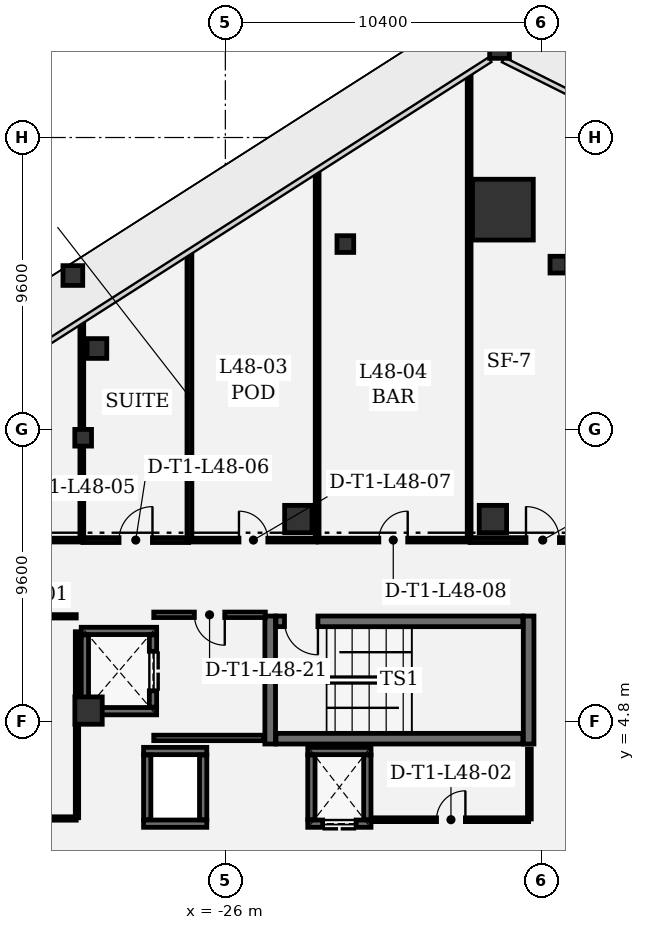
"""IFC4 building model, lengths in metres.
Left out: names, types, materials, properties, quantities, classifications, styles, units other than length and angle.
Written with IfcOpenShell. Run it as: python <this file> out.ifc"""

import sys

from ifc_helpers import new_model, si_unit, direction, frame, frame_2d, origin, origin_2d, place, context, subcontext, project, spatial, rectangle, extrude, element, fill, save


model = new_model("IFC4")
c1 = context("Model", 3, precision=1e-05, world=origin(), true_north=direction((0.0, 1.0)))
c2 = subcontext(c1, "Body", "Model", "MODEL_VIEW")
j1 = project(units=[si_unit("LENGTHUNIT", "METRE"), si_unit("PLANEANGLEUNIT", "RADIAN")], contexts=[c1])
p1 = place(None, origin())
s1 = spatial("IfcSite", under=j1, at=p1, CompositionType="ELEMENT")
p2 = place(p1, origin())
s2 = spatial("IfcBuilding", under=s1, at=p2, CompositionType="ELEMENT")
p3 = place(p2, frame((0.0, 0.0, 209.1)))
s3 = spatial("IfcBuildingStorey", under=s2, at=p3, CompositionType="ELEMENT", Elevation=209.1)
p4 = place(p3, frame((-16.872, 21.627, 0.0), z_axis=(0.0, 0.0, 1.0), x_axis=(1.0, 0.0, 0.0)))
e1 = element("IfcColumn", 1, at=p4, inside=s3, PredefinedType="COLUMN", context=c2, shape_type="SweptSolid", body=[
    extrude(rectangle(XDim=2.0, YDim=2.0, at=origin_2d()), origin(), (0.0, 0.0, 1.0), 4.05),
])
for number, where, z_axis, x_axis in (
    (2, (-23.6, 11.45, 0.0), (0.0, 0.0, 1.0), (1.0, 0.0, 0.0)),
    (3, (-17.2, 11.45, 0.0), (0.0, 0.0, 1.0), (1.0, 0.0, 0.0)),
    (4, (-30.5, 5.15, 0.0), (0.0, 0.0, 1.0), (1.0, 0.0, 0.0)),
):
    element("IfcColumn", number, at=place(p3, frame(where, z_axis=z_axis, x_axis=x_axis)), inside=s3, PredefinedType="COLUMN", context=c2, shape_type="SweptSolid", body=[
        extrude(rectangle(XDim=0.9, YDim=0.9, at=origin_2d()), origin(), (0.0, 0.0, 1.0), 4.05),
    ])
for number, where, z_axis, x_axis in (
    (5, (-31.016, 19.46, 0.0), (0.0, 0.0, 1.0), (1.0, 0.0, 0.0)),
    (6, (-16.981, 26.929, 0.0), (0.0, 0.0, 1.0), (1.0, 0.0, 0.0)),
    (7, (-30.225, 17.06, 0.0), (0.0, 0.0, 1.0), (1.0, 0.0, 0.0)),
):
    element("IfcColumn", number, at=place(p3, frame(where, z_axis=z_axis, x_axis=x_axis)), inside=s3, PredefinedType="COLUMN", context=c2, shape_type="SweptSolid", body=[
        extrude(rectangle(XDim=0.65, YDim=0.65, at=origin_2d()), origin(), (0.0, 0.0, 1.0), 4.05),
    ])
for number, where, z_axis, x_axis in (
    (8, (-22.053, 20.495, 0.0), (0.0, 0.0, 1.0), (1.0, 0.0, 0.0)),
    (9, (-30.677, 14.124, 0.0), (0.0, 0.0, 1.0), (1.0, 0.0, 0.0)),
    (10, (-15.046, 19.818, 0.0), (0.0, 0.0, 1.0), (1.0, 0.0, 0.0)),
):
    element("IfcColumn", number, at=place(p3, frame(where, z_axis=z_axis, x_axis=x_axis)), inside=s3, PredefinedType="COLUMN", context=c2, shape_type="SweptSolid", body=[
        extrude(rectangle(XDim=0.55, YDim=0.55, at=origin_2d()), origin(), (0.0, 0.0, 1.0), 4.05),
    ])
for number, where, z_axis, x_axis in (
    (11, (-24.525, 8.26, 0.0), (0.0, 0.0, 1.0), (0.0, -1.0, 0.0)),
    (12, (-16.025, 4.05, 0.0), (0.0, 0.0, 1.0), (0.0, 1.0, 0.0)),
):
    element("IfcWall", number, at=place(p3, frame(where, z_axis=z_axis, x_axis=x_axis)), inside=s3, PredefinedType="SHEAR", context=c2, shape_type="SweptSolid", body=[
        extrude(rectangle(XDim=4.21, YDim=0.35, at=frame_2d((2.105, 0.0))), origin(), (0.0, 0.0, 1.0), 3.78),
    ])
p5 = place(p3, frame((-24.335, 4.225, 0.0), z_axis=(0.0, 0.0, 1.0), x_axis=(1.0, 0.0, 0.0)))
e13 = element("IfcWall", 13, at=p5, inside=s3, PredefinedType="SHEAR", context=c2, shape_type="SweptSolid", body=[
    extrude(rectangle(XDim=8.12, YDim=0.35, at=frame_2d((4.06, 0.0))), origin(), (0.0, 0.0, 1.0), 3.78),
])
p6 = place(p3, frame((-16.215, 8.085, 0.0), z_axis=(0.0, 0.0, 1.0), x_axis=(-1.0, 0.0, 0.0)))
e14 = element("IfcWall", 14, at=p6, inside=s3, PredefinedType="SHEAR", context=c2, shape_type="SweptSolid", body=[
    extrude(rectangle(XDim=8.12, YDim=0.35, at=frame_2d((4.06, 0.0))), origin(), (0.0, 0.0, 1.0), 3.78),
])
p7 = place(p6, frame((6.74, 0.0, 0.0)))
e15 = element("IfcOpeningElement", 15, at=p7, cuts=e14, PredefinedType="OPENING", context=c2, shape_type="SweptSolid", body=[
    extrude(rectangle(XDim=1.1, YDim=2.2, at=frame_2d((0.55, 1.1))), frame((0.0, 0.185, 0.0), z_axis=(0.0, -1.0, 0.0), x_axis=(1.0, 0.0, 0.0)), (0.0, 0.0, 1.0), 0.37),
])
for number, where, z_axis, x_axis in (
    (16, (-28.26, 5.13, 0.0), (0.0, 0.0, 1.0), (-1.0, 0.0, 0.0)),
    (17, (-30.74, 7.77, 0.0), (0.0, 0.0, 1.0), (1.0, 0.0, 0.0)),
):
    element("IfcWall", number, at=place(p3, frame(where, z_axis=z_axis, x_axis=x_axis)), inside=s3, PredefinedType="SHEAR", context=c2, shape_type="SweptSolid", body=[
        extrude(rectangle(XDim=2.48, YDim=0.24, at=frame_2d((1.24, 0.0))), origin(), (0.0, 0.0, 1.0), 3.78),
    ])
p8 = place(p3, frame((-30.62, 5.262, 0.0), z_axis=(0.0, 0.0, 1.0), x_axis=(0.0, 1.0, 0.0)))
e18 = element("IfcWall", 18, at=p8, inside=s3, PredefinedType="SHEAR", context=c2, shape_type="SweptSolid", body=[
    extrude(rectangle(XDim=2.376, YDim=0.24, at=frame_2d((1.188, 0.0))), origin(), (0.0, 0.0, 1.0), 3.78),
])
p9 = place(p3, frame((-28.38, 7.638, 0.0), z_axis=(0.0, 0.0, 1.0), x_axis=(0.0, -1.0, 0.0)))
e19 = element("IfcWall", 19, at=p9, inside=s3, PredefinedType="SHEAR", context=c2, shape_type="SweptSolid", body=[
    extrude(rectangle(XDim=2.376, YDim=0.24, at=frame_2d((1.188, 0.0))), origin(), (0.0, 0.0, 1.0), 3.78),
])
p10 = place(p9, frame((0.538, 0.0, 0.0)))
e20 = element("IfcOpeningElement", 20, at=p10, cuts=e19, PredefinedType="OPENING", context=c2, shape_type="SweptSolid", body=[
    extrude(rectangle(XDim=1.3, YDim=2.3, at=frame_2d((0.65, 1.15))), frame((0.0, 0.13, 0.0), z_axis=(0.0, -1.0, 0.0), x_axis=(1.0, 0.0, 0.0)), (0.0, 0.0, 1.0), 0.26),
])
for number, where, z_axis, x_axis in (
    (21, (-26.61, 1.43, 0.0), (0.0, 0.0, 1.0), (-1.0, 0.0, 0.0)),
    (22, (-28.69, 3.82, 0.0), (0.0, 0.0, 1.0), (1.0, 0.0, 0.0)),
):
    element("IfcWall", number, at=place(p3, frame(where, z_axis=z_axis, x_axis=x_axis)), inside=s3, PredefinedType="SHEAR", context=c2, shape_type="SweptSolid", body=[
        extrude(rectangle(XDim=2.08, YDim=0.24, at=frame_2d((1.04, 0.0))), origin(), (0.0, 0.0, 1.0), 3.78),
    ])
for number, where, z_axis, x_axis in (
    (23, (-28.57, 1.562, 0.0), (0.0, 0.0, 1.0), (0.0, 1.0, 0.0)),
    (24, (-26.73, 3.688, 0.0), (0.0, 0.0, 1.0), (0.0, -1.0, 0.0)),
):
    element("IfcWall", number, at=place(p3, frame(where, z_axis=z_axis, x_axis=x_axis)), inside=s3, PredefinedType="SHEAR", context=c2, shape_type="SweptSolid", body=[
        extrude(rectangle(XDim=2.126, YDim=0.24, at=frame_2d((1.063, 0.0))), origin(), (0.0, 0.0, 1.0), 3.78),
    ])
p11 = place(p3, frame((-21.21, 1.43, 0.0), z_axis=(0.0, 0.0, 1.0), x_axis=(-1.0, 0.0, 0.0)))
e25 = element("IfcWall", 25, at=p11, inside=s3, PredefinedType="SHEAR", context=c2, shape_type="SweptSolid", body=[
    extrude(rectangle(XDim=2.08, YDim=0.24, at=frame_2d((1.04, 0.0))), origin(), (0.0, 0.0, 1.0), 3.78),
])
p12 = place(p11, frame((0.49, 0.0, 0.0)))
e26 = element("IfcOpeningElement", 26, at=p12, cuts=e25, PredefinedType="OPENING", context=c2, shape_type="SweptSolid", body=[
    extrude(rectangle(XDim=1.1, YDim=2.2, at=frame_2d((0.55, 1.1))), frame((0.0, 0.13, 0.0), z_axis=(0.0, -1.0, 0.0), x_axis=(1.0, 0.0, 0.0)), (0.0, 0.0, 1.0), 0.26),
])
p13 = place(p3, frame((-23.29, 3.82, 0.0), z_axis=(0.0, 0.0, 1.0), x_axis=(1.0, 0.0, 0.0)))
e27 = element("IfcWall", 27, at=p13, inside=s3, PredefinedType="SHEAR", context=c2, shape_type="SweptSolid", body=[
    extrude(rectangle(XDim=2.08, YDim=0.24, at=frame_2d((1.04, 0.0))), origin(), (0.0, 0.0, 1.0), 3.78),
])
for number, where, z_axis, x_axis in (
    (28, (-23.17, 1.562, 0.0), (0.0, 0.0, 1.0), (0.0, 1.0, 0.0)),
    (29, (-21.33, 3.688, 0.0), (0.0, 0.0, 1.0), (0.0, -1.0, 0.0)),
):
    element("IfcWall", number, at=place(p3, frame(where, z_axis=z_axis, x_axis=x_axis)), inside=s3, PredefinedType="SHEAR", context=c2, shape_type="SweptSolid", body=[
        extrude(rectangle(XDim=2.126, YDim=0.24, at=frame_2d((1.063, 0.0))), origin(), (0.0, 0.0, 1.0), 3.78),
    ])
p14 = place(p3, frame((-28.355, 4.25, 0.0), z_axis=(0.0, 0.0, 1.0), x_axis=(1.0, 0.0, 0.0)))
e30 = element("IfcWall", 30, at=p14, inside=s3, PredefinedType="PARTITIONING", context=c2, shape_type="SweptSolid", body=[
    extrude(rectangle(XDim=3.622, YDim=0.18, at=frame_2d((1.811, 0.0))), origin(), (0.0, 0.0, 1.0), 3.78),
])
p15 = place(p3, frame((-24.684, 8.3, 0.0), z_axis=(0.0, 0.0, 1.0), x_axis=(-1.0, 0.0, 0.0)))
e31 = element("IfcWall", 31, at=p15, inside=s3, PredefinedType="PARTITIONING", context=c2, shape_type="SweptSolid", body=[
    extrude(rectangle(XDim=3.671, YDim=0.18, at=frame_2d((1.835, 0.0))), origin(), (0.0, 0.0, 1.0), 3.78),
])
p16 = place(p15, frame((1.335, 0.0, 0.0)))
e32 = element("IfcOpeningElement", 32, at=p16, cuts=e31, PredefinedType="OPENING", context=c2, shape_type="SweptSolid", body=[
    extrude(rectangle(XDim=1.0, YDim=2.15, at=frame_2d((0.5, 1.075))), frame((0.0, 0.1, 0.0), z_axis=(0.0, -1.0, 0.0), x_axis=(1.0, 0.0, 0.0)), (0.0, 0.0, 1.0), 0.2),
])
p17 = place(p3, frame((-34.155, 1.6, 0.0), z_axis=(0.0, 0.0, 1.0), x_axis=(1.0, 0.0, 0.0)))
e33 = element("IfcWall", 33, at=p17, inside=s3, PredefinedType="PARTITIONING", context=c2, shape_type="SweptSolid", body=[
    extrude(rectangle(XDim=3.25, YDim=0.11, at=frame_2d((1.625, 0.0))), origin(), (0.0, 0.0, 1.0), 3.78),
])
p18 = place(p3, frame((-30.88, 1.625, 0.0), z_axis=(0.0, 0.0, 1.0), x_axis=(0.0, 1.0, 0.0)))
e34 = element("IfcWall", 34, at=p18, inside=s3, PredefinedType="PARTITIONING", context=c2, shape_type="SweptSolid", body=[
    extrude(rectangle(XDim=3.01, YDim=0.11, at=frame_2d((1.505, 0.0))), origin(), (0.0, 0.0, 1.0), 3.78),
])
p19 = place(p3, frame((-30.88, 5.665, 0.0), z_axis=(0.0, 0.0, 1.0), x_axis=(0.0, 1.0, 0.0)))
e35 = element("IfcWall", 35, at=p19, inside=s3, PredefinedType="PARTITIONING", context=c2, shape_type="SweptSolid", body=[
    extrude(rectangle(XDim=2.078, YDim=0.11, at=frame_2d((1.039, 0.0))), origin(), (0.0, 0.0, 1.0), 3.78),
])
p20 = place(p3, frame((-30.905, 8.25, 0.0), z_axis=(0.0, 0.0, 1.0), x_axis=(-1.0, 0.0, 0.0)))
e36 = element("IfcWall", 36, at=p20, inside=s3, PredefinedType="PARTITIONING", context=c2, shape_type="SweptSolid", body=[
    extrude(rectangle(XDim=3.25, YDim=0.11, at=frame_2d((1.625, 0.0))), origin(), (0.0, 0.0, 1.0), 3.78),
])
p21 = place(p3, frame((-21.134, 1.56, 0.0), z_axis=(0.0, 0.0, 1.0), x_axis=(1.0, 0.0, 0.0)))
e37 = element("IfcWall", 37, at=p21, inside=s3, PredefinedType="PARTITIONING", context=c2, shape_type="SweptSolid", body=[
    extrude(rectangle(XDim=5.109, YDim=0.125, at=frame_2d((2.554, 0.0))), origin(), (0.0, 0.0, 1.0), 3.78),
])
p22 = place(p21, frame((2.079, 0.0, 0.0)))
e38 = element("IfcOpeningElement", 38, at=p22, cuts=e37, PredefinedType="OPENING", context=c2, shape_type="SweptSolid", body=[
    extrude(rectangle(XDim=0.95, YDim=2.15, at=frame_2d((0.475, 1.075))), frame((0.0, 0.073, 0.0), z_axis=(0.0, -1.0, 0.0), x_axis=(1.0, 0.0, 0.0)), (0.0, 0.0, 1.0), 0.145),
])
p23 = place(p3, frame((-16.0, 1.585, 0.0), z_axis=(0.0, 0.0, 1.0), x_axis=(0.0, 1.0, 0.0)))
e39 = element("IfcWall", 39, at=p23, inside=s3, PredefinedType="PARTITIONING", context=c2, shape_type="SweptSolid", body=[
    extrude(rectangle(XDim=2.302, YDim=0.125, at=frame_2d((1.151, 0.0))), origin(), (0.0, 0.0, 1.0), 3.78),
])
p24 = place(p3, frame((-34.625, 10.758, 0.0), z_axis=(0.0, 0.0, 1.0), x_axis=(1.0, 0.0, 0.0)))
e40 = element("IfcWall", 40, at=p24, inside=s3, PredefinedType="PARTITIONING", context=c2, shape_type="SweptSolid", body=[
    extrude(rectangle(XDim=3.879, YDim=0.125, at=frame_2d((1.939, 0.0))), origin(), (0.0, 0.0, 1.0), 2.9),
])
p25 = place(p24, frame((1.464, 0.0, 0.0)))
e41 = element("IfcOpeningElement", 41, at=p25, cuts=e40, PredefinedType="OPENING", context=c2, shape_type="SweptSolid", body=[
    extrude(rectangle(XDim=0.95, YDim=2.15, at=frame_2d((0.475, 1.075))), frame((0.0, 0.073, 0.0), z_axis=(0.0, -1.0, 0.0), x_axis=(1.0, 0.0, 0.0)), (0.0, 0.0, 1.0), 0.145),
])
p26 = place(p3, frame((-30.721, 10.783, 0.0), z_axis=(0.0, 0.0, 1.0), x_axis=(0.0, 1.0, 0.0)))
e42 = element("IfcWall", 42, at=p26, inside=s3, PredefinedType="PARTITIONING", context=c2, shape_type="SweptSolid", body=[
    extrude(rectangle(XDim=3.001, YDim=0.125, at=frame_2d((1.5, 0.0))), origin(), (0.0, 0.0, 1.0), 3.78),
])
p27 = place(p3, frame((-30.721, 14.464, 0.0), z_axis=(0.0, 0.0, 1.0), x_axis=(0.0, 1.0, 0.0)))
e43 = element("IfcWall", 43, at=p27, inside=s3, PredefinedType="PARTITIONING", context=c2, shape_type="SweptSolid", body=[
    extrude(rectangle(XDim=3.434, YDim=0.125, at=frame_2d((1.717, 0.0))), origin(), (0.0, 0.0, 1.0), 3.78),
])
p28 = place(p3, frame((-30.688, 10.758, 0.0), z_axis=(0.0, 0.0, 1.0), x_axis=(1.0, 0.0, 0.0)))
e44 = element("IfcWall", 44, at=p28, inside=s3, PredefinedType="PARTITIONING", context=c2, shape_type="SweptSolid", body=[
    extrude(rectangle(XDim=3.481, YDim=0.16, at=frame_2d((1.741, 0.0))), origin(), (0.0, 0.0, 1.0), 3.78),
])
p29 = place(p28, frame((1.191, 0.0, 0.0)))
e45 = element("IfcOpeningElement", 45, at=p29, cuts=e44, PredefinedType="OPENING", context=c2, shape_type="SweptSolid", body=[
    extrude(rectangle(XDim=1.1, YDim=2.15, at=frame_2d((0.55, 1.075))), frame((0.0, 0.09, 0.0), z_axis=(0.0, -1.0, 0.0), x_axis=(1.0, 0.0, 0.0)), (0.0, 0.0, 1.0), 0.18),
])
p30 = place(p3, frame((-27.182, 10.783, 0.0), z_axis=(0.0, 0.0, 1.0), x_axis=(0.0, 1.0, 0.0)))
e46 = element("IfcWall", 46, at=p30, inside=s3, PredefinedType="PARTITIONING", context=c2, shape_type="SweptSolid", body=[
    extrude(rectangle(XDim=9.378, YDim=0.16, at=frame_2d((4.689, 0.0))), origin(), (0.0, 0.0, 1.0), 3.344),
])
p31 = place(p3, frame((-27.149, 10.758, 0.0), z_axis=(0.0, 0.0, 1.0), x_axis=(1.0, 0.0, 0.0)))
e47 = element("IfcWall", 47, at=p31, inside=s3, PredefinedType="PARTITIONING", context=c2, shape_type="SweptSolid", body=[
    extrude(rectangle(XDim=4.143, YDim=0.125, at=frame_2d((2.072, 0.0))), origin(), (0.0, 0.0, 1.0), 3.78),
])
p32 = place(p31, frame((1.596, 0.0, 0.0)))
e48 = element("IfcOpeningElement", 48, at=p32, cuts=e47, PredefinedType="OPENING", context=c2, shape_type="SweptSolid", body=[
    extrude(rectangle(XDim=0.95, YDim=2.15, at=frame_2d((0.475, 1.075))), frame((0.0, 0.073, 0.0), z_axis=(0.0, -1.0, 0.0), x_axis=(1.0, 0.0, 0.0)), (0.0, 0.0, 1.0), 0.145),
])
p33 = place(p3, frame((-22.981, 10.783, 0.0), z_axis=(0.0, 0.0, 1.0), x_axis=(0.0, 1.0, 0.0)))
e49 = element("IfcWall", 49, at=p33, inside=s3, PredefinedType="PARTITIONING", context=c2, shape_type="SweptSolid", body=[
    extrude(rectangle(XDim=12.062, YDim=0.125, at=frame_2d((6.031, 0.0))), origin(), (0.0, 0.0, 1.0), 2.895),
])
p34 = place(p3, frame((-22.948, 10.758, 0.0), z_axis=(0.0, 0.0, 1.0), x_axis=(1.0, 0.0, 0.0)))
e50 = element("IfcWall", 50, at=p34, inside=s3, PredefinedType="PARTITIONING", context=c2, shape_type="SweptSolid", body=[
    extrude(rectangle(XDim=4.942, YDim=0.125, at=frame_2d((2.471, 0.0))), origin(), (0.0, 0.0, 1.0), 3.78),
])
p35 = place(p34, frame((1.996, 0.0, 0.0)))
e51 = element("IfcOpeningElement", 51, at=p35, cuts=e50, PredefinedType="OPENING", context=c2, shape_type="SweptSolid", body=[
    extrude(rectangle(XDim=0.95, YDim=2.15, at=frame_2d((0.475, 1.075))), frame((0.0, 0.073, 0.0), z_axis=(0.0, -1.0, 0.0), x_axis=(1.0, 0.0, 0.0)), (0.0, 0.0, 1.0), 0.145),
])
p36 = place(p3, frame((-17.981, 10.783, 0.0), z_axis=(0.0, 0.0, 1.0), x_axis=(0.0, 1.0, 0.0)))
e52 = element("IfcWall", 52, at=p36, inside=s3, PredefinedType="PARTITIONING", context=c2, shape_type="SweptSolid", body=[
    extrude(rectangle(XDim=15.258, YDim=0.125, at=frame_2d((7.629, 0.0))), origin(), (0.0, 0.0, 1.0), 2.895),
])
p37 = place(p3, frame((-17.948, 10.758, 0.0), z_axis=(0.0, 0.0, 1.0), x_axis=(1.0, 0.0, 0.0)))
e53 = element("IfcWall", 53, at=p37, inside=s3, PredefinedType="PARTITIONING", context=c2, shape_type="SweptSolid", body=[
    extrude(rectangle(XDim=4.774, YDim=0.16, at=frame_2d((2.387, 0.0))), origin(), (0.0, 0.0, 1.0), 3.344),
])
p38 = place(p37, frame((1.837, 0.0, 0.0)))
e54 = element("IfcOpeningElement", 54, at=p38, cuts=e53, PredefinedType="OPENING", context=c2, shape_type="SweptSolid", body=[
    extrude(rectangle(XDim=1.1, YDim=2.15, at=frame_2d((0.55, 1.075))), frame((0.0, 0.09, 0.0), z_axis=(0.0, -1.0, 0.0), x_axis=(1.0, 0.0, 0.0)), (0.0, 0.0, 1.0), 0.18),
])
p39 = place(p7, origin())
e55 = element("IfcDoor", 55, at=p39, inside=s3, OperationType="SINGLE_SWING_LEFT", PredefinedType="DOOR", context=c2, shape_type="SweptSolid", body=[
    extrude(rectangle(XDim=1.1, YDim=2.2, at=frame_2d((0.55, 1.1))), frame((0.0, 0.025, 0.0), z_axis=(0.0, -1.0, 0.0), x_axis=(1.0, 0.0, 0.0)), (0.0, 0.0, 1.0), 0.05),
])
fill(e15, e55)
p40 = place(p10, origin())
e56 = element("IfcDoor", 56, at=p40, inside=s3, OperationType="DOUBLE_DOOR_SLIDING", PredefinedType="DOOR", context=c2, shape_type="SweptSolid", body=[
    extrude(rectangle(XDim=1.3, YDim=2.3, at=frame_2d((0.65, 1.15))), frame((0.0, 0.025, 0.0), z_axis=(0.0, -1.0, 0.0), x_axis=(1.0, 0.0, 0.0)), (0.0, 0.0, 1.0), 0.05),
])
fill(e20, e56)
p41 = place(p12, origin())
e57 = element("IfcDoor", 57, at=p41, inside=s3, OperationType="DOUBLE_DOOR_SLIDING", PredefinedType="DOOR", context=c2, shape_type="SweptSolid", body=[
    extrude(rectangle(XDim=1.1, YDim=2.2, at=frame_2d((0.55, 1.1))), frame((0.0, 0.025, 0.0), z_axis=(0.0, -1.0, 0.0), x_axis=(1.0, 0.0, 0.0)), (0.0, 0.0, 1.0), 0.05),
])
fill(e26, e57)
p42 = place(p22, origin())
e58 = element("IfcDoor", 58, at=p42, inside=s3, OperationType="SINGLE_SWING_RIGHT", PredefinedType="DOOR", context=c2, shape_type="SweptSolid", body=[
    extrude(rectangle(XDim=0.95, YDim=2.15, at=frame_2d((0.475, 1.075))), frame((0.0, 0.025, 0.0), z_axis=(0.0, -1.0, 0.0), x_axis=(1.0, 0.0, 0.0)), (0.0, 0.0, 1.0), 0.05),
])
fill(e38, e58)
p43 = place(p29, origin())
e59 = element("IfcDoor", 59, at=p43, inside=s3, OperationType="SINGLE_SWING_RIGHT", PredefinedType="DOOR", context=c2, shape_type="SweptSolid", body=[
    extrude(rectangle(XDim=1.1, YDim=2.15, at=frame_2d((0.55, 1.075))), frame((0.0, 0.025, 0.0), z_axis=(0.0, -1.0, 0.0), x_axis=(1.0, 0.0, 0.0)), (0.0, 0.0, 1.0), 0.05),
])
fill(e45, e59)
p44 = place(p32, origin())
e60 = element("IfcDoor", 60, at=p44, inside=s3, OperationType="SINGLE_SWING_LEFT", PredefinedType="DOOR", context=c2, shape_type="SweptSolid", body=[
    extrude(rectangle(XDim=0.95, YDim=2.15, at=frame_2d((0.475, 1.075))), frame((0.0, 0.025, 0.0), z_axis=(0.0, -1.0, 0.0), x_axis=(1.0, 0.0, 0.0)), (0.0, 0.0, 1.0), 0.05),
])
fill(e48, e60)
p45 = place(p35, origin())
e61 = element("IfcDoor", 61, at=p45, inside=s3, OperationType="SINGLE_SWING_RIGHT", PredefinedType="DOOR", context=c2, shape_type="SweptSolid", body=[
    extrude(rectangle(XDim=0.95, YDim=2.15, at=frame_2d((0.475, 1.075))), frame((0.0, 0.025, 0.0), z_axis=(0.0, -1.0, 0.0), x_axis=(1.0, 0.0, 0.0)), (0.0, 0.0, 1.0), 0.05),
])
fill(e51, e61)
p46 = place(p38, origin())
e62 = element("IfcDoor", 62, at=p46, inside=s3, OperationType="SINGLE_SWING_LEFT", PredefinedType="DOOR", context=c2, shape_type="SweptSolid", body=[
    extrude(rectangle(XDim=1.1, YDim=2.15, at=frame_2d((0.55, 1.075))), frame((0.0, 0.025, 0.0), z_axis=(0.0, -1.0, 0.0), x_axis=(1.0, 0.0, 0.0)), (0.0, 0.0, 1.0), 0.05),
])
fill(e54, e62)
p47 = place(p16, origin())
e63 = element("IfcDoor", 63, at=p47, inside=s3, OperationType="SINGLE_SWING_LEFT", PredefinedType="DOOR", context=c2, shape_type="SweptSolid", body=[
    extrude(rectangle(XDim=1.0, YDim=2.15, at=frame_2d((0.5, 1.075))), frame((0.0, 0.025, 0.0), z_axis=(0.0, -1.0, 0.0), x_axis=(1.0, 0.0, 0.0)), (0.0, 0.0, 1.0), 0.05),
])
fill(e32, e63)
save(model, sys.argv[1])
